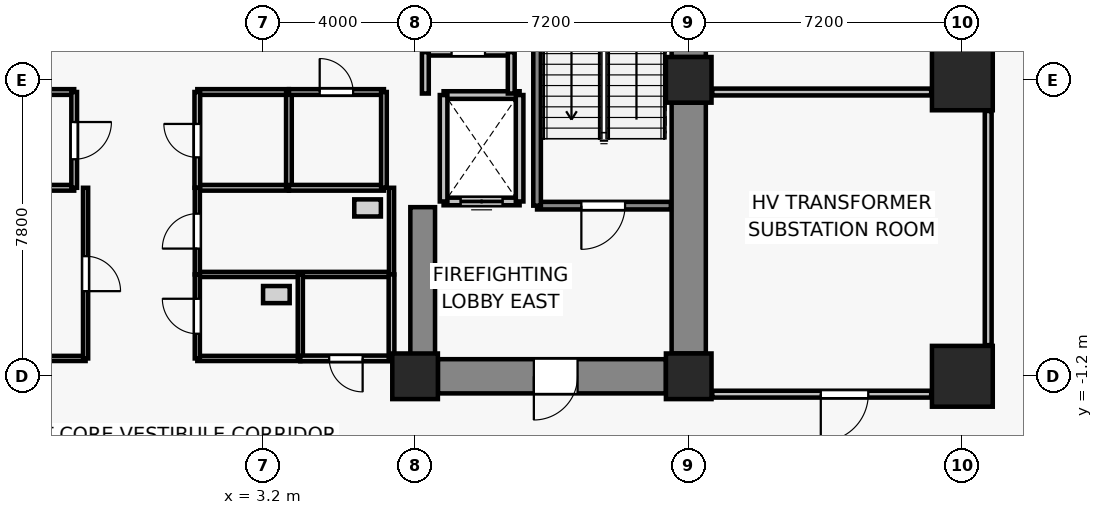
"""IFC4 building model, lengths in metres.
Left out: names, types, materials, properties, quantities, classifications, styles, units other than length and angle.
Written with IfcOpenShell. Run it as: python <this file> out.ifc"""

import sys

from ifc_helpers import new_model, si_unit, direction, frame, frame_2d, origin, origin_2d, place, context, subcontext, project, spatial, rectangle, extrude, source, transform, mapped, element, fill, save


model = new_model("IFC4")
c1 = context("Model", 3, precision=1e-05, world=origin(), true_north=direction((0.0, 1.0)))
c2 = subcontext(c1, "Body", "Model", "MODEL_VIEW")
j1 = project(units=[si_unit("LENGTHUNIT", "METRE"), si_unit("PLANEANGLEUNIT", "RADIAN")], contexts=[c1])
p1 = place(None, origin())
s1 = spatial("IfcSite", under=j1, at=p1, CompositionType="ELEMENT")
p2 = place(p1, origin())
s2 = spatial("IfcBuilding", under=s1, at=p2, CompositionType="ELEMENT")
p3 = place(p2, frame((0.0, 0.0, -8.8)))
s3 = spatial("IfcBuildingStorey", under=s2, at=p3, CompositionType="ELEMENT", Elevation=-8.8)
for number, where, z_axis, x_axis in (
    (1, (7.2, -1.2, 0.0), (0.0, 0.0, 1.0), (1.0, 0.0, 0.0)),
    (2, (14.4, -1.2, 0.0), (0.0, 0.0, 1.0), (1.0, 0.0, 0.0)),
    (3, (14.4, 6.6, 0.0), (0.0, 0.0, 1.0), (1.0, 0.0, 0.0)),
):
    element("IfcColumn", number, at=place(p3, frame(where, z_axis=z_axis, x_axis=x_axis)), inside=s3, PredefinedType="COLUMN", context=c2, shape_type="SweptSolid", body=[
        extrude(rectangle(XDim=1.2, YDim=1.2, at=origin_2d()), origin(), (0.0, 0.0, 1.0), 4.4),
    ])
for number, where, z_axis, x_axis in (
    (4, (21.6, -1.2, 0.0), (0.0, 0.0, 1.0), (1.0, 0.0, 0.0)),
    (5, (21.6, 6.6, 0.0), (0.0, 0.0, 1.0), (1.0, 0.0, 0.0)),
):
    element("IfcColumn", number, at=place(p3, frame(where, z_axis=z_axis, x_axis=x_axis)), inside=s3, PredefinedType="COLUMN", context=c2, shape_type="SweptSolid", body=[
        extrude(rectangle(XDim=1.6, YDim=1.6, at=origin_2d()), origin(), (0.0, 0.0, 1.0), 4.4),
    ])
p4 = place(p3, frame((14.4, -0.6, 0.0), z_axis=(0.0, 0.0, 1.0), x_axis=(0.0, 1.0, 0.0)))
e6 = element("IfcWall", 6, at=p4, inside=s3, PredefinedType="SHEAR", context=c2, shape_type="SweptSolid", body=[
    extrude(rectangle(XDim=6.6, YDim=0.9, at=frame_2d((3.3, 0.0))), origin(), (0.0, 0.0, 1.0), 4.12),
])
p5 = place(p3, frame((14.4, 7.2, 0.0), z_axis=(0.0, 0.0, 1.0), x_axis=(0.0, 1.0, 0.0)))
e7 = element("IfcWall", 7, at=p5, inside=s3, PredefinedType="SHEAR", context=c2, shape_type="SweptSolid", body=[
    extrude(rectangle(XDim=5.7, YDim=0.9, at=frame_2d((2.85, 0.0))), origin(), (0.0, 0.0, 1.0), 4.12),
])
p6 = place(p3, frame((13.8, -1.2, 0.0), z_axis=(0.0, 0.0, 1.0), x_axis=(-1.0, 0.0, 0.0)))
e8 = element("IfcWall", 8, at=p6, inside=s3, PredefinedType="SHEAR", context=c2, shape_type="SweptSolid", body=[
    extrude(rectangle(XDim=6.0, YDim=0.9, at=frame_2d((3.0, 0.0))), origin(), (0.0, 0.0, 1.0), 4.12),
])
p7 = place(p6, frame((2.325, 0.0, 0.0)))
e9 = element("IfcOpeningElement", 9, at=p7, cuts=e8, PredefinedType="OPENING", context=c2, shape_type="SweptSolid", body=[
    extrude(rectangle(XDim=1.15, YDim=2.15, at=frame_2d((0.575, 1.075))), frame((0.0, 0.46, 0.0), z_axis=(0.0, -1.0, 0.0), x_axis=(1.0, 0.0, 0.0)), (0.0, 0.0, 1.0), 0.92),
])
p8 = place(p3, frame((7.4, -0.75, 0.0), z_axis=(0.0, 0.0, 1.0), x_axis=(0.0, 1.0, 0.0)))
e10 = element("IfcWall", 10, at=p8, inside=s3, PredefinedType="SHEAR", context=c2, shape_type="SweptSolid", body=[
    extrude(rectangle(XDim=4.0, YDim=0.65, at=frame_2d((2.0, 0.0))), origin(), (0.0, 0.0, 1.0), 4.12),
])
p9 = place(p3, frame((9.95, 3.4, 0.0), z_axis=(0.0, 0.0, 1.0), x_axis=(-1.0, 0.0, 0.0)))
e11 = element("IfcWall", 11, at=p9, inside=s3, PredefinedType="SOLIDWALL", context=c2, shape_type="SweptSolid", body=[
    extrude(rectangle(XDim=2.0, YDim=0.2, at=frame_2d((1.0, 0.0))), origin(), (0.0, 0.0, 1.0), 4.12),
])
p10 = place(p9, frame((0.45, 0.0, 0.0)))
e12 = element("IfcOpeningElement", 12, at=p10, cuts=e11, PredefinedType="OPENING", context=c2, shape_type="SweptSolid", body=[
    extrude(rectangle(XDim=1.1, YDim=2.2, at=frame_2d((0.55, 1.1))), frame((0.0, 0.11, 0.0), z_axis=(0.0, -1.0, 0.0), x_axis=(1.0, 0.0, 0.0)), (0.0, 0.0, 1.0), 0.22),
])
p11 = place(p3, frame((7.95, 6.2, 0.0), z_axis=(0.0, 0.0, 1.0), x_axis=(1.0, 0.0, 0.0)))
e13 = element("IfcWall", 13, at=p11, inside=s3, PredefinedType="SOLIDWALL", context=c2, shape_type="SweptSolid", body=[
    extrude(rectangle(XDim=2.0, YDim=0.2, at=frame_2d((1.0, 0.0))), origin(), (0.0, 0.0, 1.0), 4.12),
])
for number, where, z_axis, x_axis in (
    (14, (7.95, 3.4, 0.0), (0.0, 0.0, 1.0), (0.0, 1.0, 0.0)),
    (15, (9.95, 6.2, 0.0), (0.0, 0.0, 1.0), (0.0, -1.0, 0.0)),
):
    element("IfcWall", number, at=place(p3, frame(where, z_axis=z_axis, x_axis=x_axis)), inside=s3, PredefinedType="SOLIDWALL", context=c2, shape_type="SweptSolid", body=[
        extrude(rectangle(XDim=2.8, YDim=0.2, at=frame_2d((1.4, 0.0))), origin(), (0.0, 0.0, 1.0), 4.12),
    ])
p12 = place(p3, frame((13.93, 3.29, 0.0), z_axis=(0.0, 0.0, 1.0), x_axis=(-1.0, 0.0, 0.0)))
e16 = element("IfcWall", 16, at=p12, inside=s3, PredefinedType="SOLIDWALL", context=c2, shape_type="SweptSolid", body=[
    extrude(rectangle(XDim=3.52, YDim=0.2, at=frame_2d((1.76, 0.0))), origin(), (0.0, 0.0, 1.0), 4.12),
])
p13 = place(p12, frame((1.205, 0.0, 0.0)))
e17 = element("IfcOpeningElement", 17, at=p13, cuts=e16, PredefinedType="OPENING", context=c2, shape_type="SweptSolid", body=[
    extrude(rectangle(XDim=1.15, YDim=2.15, at=frame_2d((0.575, 1.075))), frame((0.0, 0.11, 0.0), z_axis=(0.0, -1.0, 0.0), x_axis=(1.0, 0.0, 0.0)), (0.0, 0.0, 1.0), 0.22),
])
p14 = place(p3, frame((10.41, 3.29, 0.0), z_axis=(0.0, 0.0, 1.0), x_axis=(0.0, 1.0, 0.0)))
e18 = element("IfcWall", 18, at=p14, inside=s3, PredefinedType="SOLIDWALL", context=c2, shape_type="SweptSolid", body=[
    extrude(rectangle(XDim=8.84, YDim=0.2, at=frame_2d((4.42, 0.0))), origin(), (0.0, 0.0, 1.0), 4.12),
])
p15 = place(p3, frame((7.47, 7.33, 0.0), z_axis=(0.0, 0.0, 1.0), x_axis=(1.0, 0.0, 0.0)))
e19 = element("IfcWall", 19, at=p15, inside=s3, PredefinedType="PARTITIONING", context=c2, shape_type="SweptSolid", body=[
    extrude(rectangle(XDim=2.26, YDim=0.18, at=frame_2d((1.13, 0.0))), origin(), (0.0, 0.0, 1.0), 3.41),
])
p16 = place(p15, frame((0.69, 0.0, 0.0)))
e20 = element("IfcOpeningElement", 20, at=p16, cuts=e19, PredefinedType="OPENING", context=c2, shape_type="SweptSolid", body=[
    extrude(rectangle(XDim=0.88, YDim=2.1, at=frame_2d((0.44, 1.05))), frame((0.0, 0.1, 0.0), z_axis=(0.0, -1.0, 0.0), x_axis=(1.0, 0.0, 0.0)), (0.0, 0.0, 1.0), 0.2),
])
p17 = place(p3, frame((7.47, 6.24, 0.0), z_axis=(0.0, 0.0, 1.0), x_axis=(0.0, 1.0, 0.0)))
e21 = element("IfcWall", 21, at=p17, inside=s3, PredefinedType="PARTITIONING", context=c2, shape_type="SweptSolid", body=[
    extrude(rectangle(XDim=1.09, YDim=0.18, at=frame_2d((0.545, 0.0))), origin(), (0.0, 0.0, 1.0), 3.41),
])
p18 = place(p3, frame((9.73, 7.33, 0.0), z_axis=(0.0, 0.0, 1.0), x_axis=(0.0, -1.0, 0.0)))
e22 = element("IfcWall", 22, at=p18, inside=s3, PredefinedType="PARTITIONING", context=c2, shape_type="SweptSolid", body=[
    extrude(rectangle(XDim=1.09, YDim=0.18, at=frame_2d((0.545, 0.0))), origin(), (0.0, 0.0, 1.0), 4.12),
])
for number, where, z_axis, x_axis in (
    (23, (-1.77, 3.76, 0.0), (0.0, 0.0, 1.0), (-1.0, 0.0, 0.0)),
    (24, (-6.18, 6.28, 0.0), (0.0, 0.0, 1.0), (1.0, 0.0, 0.0)),
):
    element("IfcWall", number, at=place(p3, frame(where, z_axis=z_axis, x_axis=x_axis)), inside=s3, PredefinedType="PARTITIONING", context=c2, shape_type="SweptSolid", body=[
        extrude(rectangle(XDim=4.41, YDim=0.15, at=frame_2d((2.205, 0.0))), origin(), (0.0, 0.0, 1.0), 4.12),
    ])
p19 = place(p3, frame((-1.77, 6.28, 0.0), z_axis=(0.0, 0.0, 1.0), x_axis=(0.0, -1.0, 0.0)))
e25 = element("IfcWall", 25, at=p19, inside=s3, PredefinedType="PARTITIONING", context=c2, shape_type="SweptSolid", body=[
    extrude(rectangle(XDim=2.52, YDim=0.15, at=frame_2d((1.26, 0.0))), origin(), (0.0, 0.0, 1.0), 4.12),
])
p20 = place(p19, frame((0.79, 0.0, 0.0)))
e26 = element("IfcOpeningElement", 26, at=p20, cuts=e25, PredefinedType="OPENING", context=c2, shape_type="SweptSolid", body=[
    extrude(rectangle(XDim=0.98, YDim=2.15, at=frame_2d((0.49, 1.075))), frame((0.0, 0.085, 0.0), z_axis=(0.0, -1.0, 0.0), x_axis=(1.0, 0.0, 0.0)), (0.0, 0.0, 1.0), 0.17),
])
for number, where, z_axis, x_axis in (
    (27, (3.88, 3.76, 0.0), (0.0, 0.0, 1.0), (-1.0, 0.0, 0.0)),
    (28, (1.47, 6.28, 0.0), (0.0, 0.0, 1.0), (1.0, 0.0, 0.0)),
):
    element("IfcWall", number, at=place(p3, frame(where, z_axis=z_axis, x_axis=x_axis)), inside=s3, PredefinedType="PARTITIONING", context=c2, shape_type="SweptSolid", body=[
        extrude(rectangle(XDim=2.41, YDim=0.15, at=frame_2d((1.205, 0.0))), origin(), (0.0, 0.0, 1.0), 4.12),
    ])
p21 = place(p3, frame((1.47, 3.76, 0.0), z_axis=(0.0, 0.0, 1.0), x_axis=(0.0, 1.0, 0.0)))
e29 = element("IfcWall", 29, at=p21, inside=s3, PredefinedType="PARTITIONING", context=c2, shape_type="SweptSolid", body=[
    extrude(rectangle(XDim=2.52, YDim=0.15, at=frame_2d((1.26, 0.0))), origin(), (0.0, 0.0, 1.0), 4.12),
])
p22 = place(p21, frame((0.8, 0.0, 0.0)))
e30 = element("IfcOpeningElement", 30, at=p22, cuts=e29, PredefinedType="OPENING", context=c2, shape_type="SweptSolid", body=[
    extrude(rectangle(XDim=0.88, YDim=2.1, at=frame_2d((0.44, 1.05))), frame((0.0, 0.085, 0.0), z_axis=(0.0, -1.0, 0.0), x_axis=(1.0, 0.0, 0.0)), (0.0, 0.0, 1.0), 0.17),
])
p23 = place(p3, frame((3.88, 6.28, 0.0), z_axis=(0.0, 0.0, 1.0), x_axis=(0.0, -1.0, 0.0)))
e31 = element("IfcWall", 31, at=p23, inside=s3, PredefinedType="PARTITIONING", context=c2, shape_type="SweptSolid", body=[
    extrude(rectangle(XDim=2.52, YDim=0.15, at=frame_2d((1.26, 0.0))), origin(), (0.0, 0.0, 1.0), 4.12),
])
p24 = place(p3, frame((6.38, 3.76, 0.0), z_axis=(0.0, 0.0, 1.0), x_axis=(-1.0, 0.0, 0.0)))
e32 = element("IfcWall", 32, at=p24, inside=s3, PredefinedType="PARTITIONING", context=c2, shape_type="SweptSolid", body=[
    extrude(rectangle(XDim=2.5, YDim=0.15, at=frame_2d((1.25, 0.0))), origin(), (0.0, 0.0, 1.0), 4.12),
])
p25 = place(p3, frame((3.88, 6.28, 0.0), z_axis=(0.0, 0.0, 1.0), x_axis=(1.0, 0.0, 0.0)))
e33 = element("IfcWall", 33, at=p25, inside=s3, PredefinedType="PARTITIONING", context=c2, shape_type="SweptSolid", body=[
    extrude(rectangle(XDim=2.5, YDim=0.15, at=frame_2d((1.25, 0.0))), origin(), (0.0, 0.0, 1.0), 4.12),
])
p26 = place(p25, frame((0.81, 0.0, 0.0)))
e34 = element("IfcOpeningElement", 34, at=p26, cuts=e33, PredefinedType="OPENING", context=c2, shape_type="SweptSolid", body=[
    extrude(rectangle(XDim=0.88, YDim=2.15, at=frame_2d((0.44, 1.075))), frame((0.0, 0.085, 0.0), z_axis=(0.0, -1.0, 0.0), x_axis=(1.0, 0.0, 0.0)), (0.0, 0.0, 1.0), 0.17),
])
p27 = place(p3, frame((6.38, 6.28, 0.0), z_axis=(0.0, 0.0, 1.0), x_axis=(0.0, -1.0, 0.0)))
e35 = element("IfcWall", 35, at=p27, inside=s3, PredefinedType="PARTITIONING", context=c2, shape_type="SweptSolid", body=[
    extrude(rectangle(XDim=2.52, YDim=0.15, at=frame_2d((1.26, 0.0))), origin(), (0.0, 0.0, 1.0), 4.12),
])
p28 = place(p3, frame((-1.47, -0.73, 0.0), z_axis=(0.0, 0.0, 1.0), x_axis=(-1.0, 0.0, 0.0)))
e36 = element("IfcWall", 36, at=p28, inside=s3, PredefinedType="PARTITIONING", context=c2, shape_type="SweptSolid", body=[
    extrude(rectangle(XDim=5.11, YDim=0.135, at=frame_2d((2.555, 0.0))), origin(), (0.0, 0.0, 1.0), 4.12),
])
p29 = place(p3, frame((-1.47, 3.76, 0.0), z_axis=(0.0, 0.0, 1.0), x_axis=(0.0, -1.0, 0.0)))
e37 = element("IfcWall", 37, at=p29, inside=s3, PredefinedType="PARTITIONING", context=c2, shape_type="SweptSolid", body=[
    extrude(rectangle(XDim=4.49, YDim=0.135, at=frame_2d((2.245, 0.0))), origin(), (0.0, 0.0, 1.0), 3.493),
])
p30 = place(p29, frame((1.8, 0.0, 0.0)))
e38 = element("IfcOpeningElement", 38, at=p30, cuts=e37, PredefinedType="OPENING", context=c2, shape_type="SweptSolid", body=[
    extrude(rectangle(XDim=0.92, YDim=2.1, at=frame_2d((0.46, 1.05))), frame((0.0, 0.077, 0.0), z_axis=(0.0, -1.0, 0.0), x_axis=(1.0, 0.0, 0.0)), (0.0, 0.0, 1.0), 0.155),
])
p31 = place(p3, frame((6.58, 1.48, 0.0), z_axis=(0.0, 0.0, 1.0), x_axis=(-1.0, 0.0, 0.0)))
e39 = element("IfcWall", 39, at=p31, inside=s3, PredefinedType="PARTITIONING", context=c2, shape_type="SweptSolid", body=[
    extrude(rectangle(XDim=5.11, YDim=0.135, at=frame_2d((2.555, 0.0))), origin(), (0.0, 0.0, 1.0), 4.12),
])
p32 = place(p3, frame((1.47, 1.48, 0.0), z_axis=(0.0, 0.0, 1.0), x_axis=(0.0, 1.0, 0.0)))
e40 = element("IfcWall", 40, at=p32, inside=s3, PredefinedType="PARTITIONING", context=c2, shape_type="SweptSolid", body=[
    extrude(rectangle(XDim=2.28, YDim=0.135, at=frame_2d((1.14, 0.0))), origin(), (0.0, 0.0, 1.0), 3.493),
])
p33 = place(p32, frame((0.68, 0.0, 0.0)))
e41 = element("IfcOpeningElement", 41, at=p33, cuts=e40, PredefinedType="OPENING", context=c2, shape_type="SweptSolid", body=[
    extrude(rectangle(XDim=0.92, YDim=2.1, at=frame_2d((0.46, 1.05))), frame((0.0, 0.077, 0.0), z_axis=(0.0, -1.0, 0.0), x_axis=(1.0, 0.0, 0.0)), (0.0, 0.0, 1.0), 0.155),
])
p34 = place(p3, frame((6.58, 3.76, 0.0), z_axis=(0.0, 0.0, 1.0), x_axis=(0.0, -1.0, 0.0)))
e42 = element("IfcWall", 42, at=p34, inside=s3, PredefinedType="PARTITIONING", context=c2, shape_type="SweptSolid", body=[
    extrude(rectangle(XDim=2.28, YDim=0.135, at=frame_2d((1.14, 0.0))), origin(), (0.0, 0.0, 1.0), 3.493),
])
p35 = place(p3, frame((4.18, -0.73, 0.0), z_axis=(0.0, 0.0, 1.0), x_axis=(-1.0, 0.0, 0.0)))
e43 = element("IfcWall", 43, at=p35, inside=s3, PredefinedType="PARTITIONING", context=c2, shape_type="SweptSolid", body=[
    extrude(rectangle(XDim=2.71, YDim=0.135, at=frame_2d((1.355, 0.0))), origin(), (0.0, 0.0, 1.0), 4.12),
])
p36 = place(p3, frame((1.47, -0.73, 0.0), z_axis=(0.0, 0.0, 1.0), x_axis=(0.0, 1.0, 0.0)))
e44 = element("IfcWall", 44, at=p36, inside=s3, PredefinedType="PARTITIONING", context=c2, shape_type="SweptSolid", body=[
    extrude(rectangle(XDim=2.21, YDim=0.135, at=frame_2d((1.105, 0.0))), origin(), (0.0, 0.0, 1.0), 4.12),
])
p37 = place(p36, frame((0.65, 0.0, 0.0)))
e45 = element("IfcOpeningElement", 45, at=p37, cuts=e44, PredefinedType="OPENING", context=c2, shape_type="SweptSolid", body=[
    extrude(rectangle(XDim=0.92, YDim=2.1, at=frame_2d((0.46, 1.05))), frame((0.0, 0.077, 0.0), z_axis=(0.0, -1.0, 0.0), x_axis=(1.0, 0.0, 0.0)), (0.0, 0.0, 1.0), 0.155),
])
p38 = place(p3, frame((4.18, 1.48, 0.0), z_axis=(0.0, 0.0, 1.0), x_axis=(0.0, -1.0, 0.0)))
e46 = element("IfcWall", 46, at=p38, inside=s3, PredefinedType="PARTITIONING", context=c2, shape_type="SweptSolid", body=[
    extrude(rectangle(XDim=2.21, YDim=0.135, at=frame_2d((1.105, 0.0))), origin(), (0.0, 0.0, 1.0), 4.12),
])
p39 = place(p3, frame((6.58, -0.73, 0.0), z_axis=(0.0, 0.0, 1.0), x_axis=(-1.0, 0.0, 0.0)))
e47 = element("IfcWall", 47, at=p39, inside=s3, PredefinedType="PARTITIONING", context=c2, shape_type="SweptSolid", body=[
    extrude(rectangle(XDim=2.4, YDim=0.15, at=frame_2d((1.2, 0.0))), origin(), (0.0, 0.0, 1.0), 4.12),
])
p40 = place(p39, frame((0.76, 0.0, 0.0)))
e48 = element("IfcOpeningElement", 48, at=p40, cuts=e47, PredefinedType="OPENING", context=c2, shape_type="SweptSolid", body=[
    extrude(rectangle(XDim=0.88, YDim=2.1, at=frame_2d((0.44, 1.05))), frame((0.0, 0.085, 0.0), z_axis=(0.0, -1.0, 0.0), x_axis=(1.0, 0.0, 0.0)), (0.0, 0.0, 1.0), 0.17),
])
p41 = place(p3, frame((6.58, 1.48, 0.0), z_axis=(0.0, 0.0, 1.0), x_axis=(0.0, -1.0, 0.0)))
e49 = element("IfcWall", 49, at=p41, inside=s3, PredefinedType="PARTITIONING", context=c2, shape_type="SweptSolid", body=[
    extrude(rectangle(XDim=2.21, YDim=0.15, at=frame_2d((1.105, 0.0))), origin(), (0.0, 0.0, 1.0), 4.12),
])
p42 = place(p3, frame((20.78, -1.67, 0.0), z_axis=(0.0, 0.0, 1.0), x_axis=(-1.0, 0.0, 0.0)))
e50 = element("IfcWall", 50, at=p42, inside=s3, PredefinedType="PARTITIONING", context=c2, shape_type="SweptSolid", body=[
    extrude(rectangle(XDim=5.76, YDim=0.18, at=frame_2d((2.88, 0.0))), origin(), (0.0, 0.0, 1.0), 4.12),
])
p43 = place(p42, frame((1.655, 0.0, 0.0)))
e51 = element("IfcOpeningElement", 51, at=p43, cuts=e50, PredefinedType="OPENING", context=c2, shape_type="SweptSolid", body=[
    extrude(rectangle(XDim=1.25, YDim=2.15, at=frame_2d((0.625, 1.075))), frame((0.0, 0.1, 0.0), z_axis=(0.0, -1.0, 0.0), x_axis=(1.0, 0.0, 0.0)), (0.0, 0.0, 1.0), 0.2),
])
p44 = place(p3, frame((15.02, 6.28, 0.0), z_axis=(0.0, 0.0, 1.0), x_axis=(1.0, 0.0, 0.0)))
e52 = element("IfcWall", 52, at=p44, inside=s3, PredefinedType="PARTITIONING", context=c2, shape_type="SweptSolid", body=[
    extrude(rectangle(XDim=5.76, YDim=0.18, at=frame_2d((2.88, 0.0))), origin(), (0.0, 0.0, 1.0), 4.12),
])
p45 = place(p3, frame((22.28, 5.78, 0.0), z_axis=(0.0, 0.0, 1.0), x_axis=(0.0, -1.0, 0.0)))
e53 = element("IfcWall", 53, at=p45, inside=s3, PredefinedType="PARTITIONING", context=c2, shape_type="SweptSolid", body=[
    extrude(rectangle(XDim=6.16, YDim=0.18, at=frame_2d((3.08, 0.0))), origin(), (0.0, 0.0, 1.0), 3.493),
])
m1 = source(origin(), c2, "Body", "SweptSolid", [
    extrude(rectangle(XDim=1.1, YDim=2.2, at=frame_2d((0.55, 1.1))), frame((0.0, 0.025, 0.0), z_axis=(0.0, -1.0, 0.0), x_axis=(1.0, 0.0, 0.0)), (0.0, 0.0, 1.0), 0.05),
])
p46 = place(p10, origin())
e54 = element("IfcDoor", 54, at=p46, inside=s3, OperationType="DOUBLE_DOOR_SLIDING", PredefinedType="DOOR", context=c2, shape_type="MappedRepresentation", body=[
    mapped(m1, transform((0.0, 0.0, 0.0), x_axis=(1.0, 0.0, 0.0), y_axis=(0.0, 1.0, 0.0), z_axis=(0.0, 0.0, 1.0), scale=1.0)),
])
fill(e12, e54)
m2 = source(origin(), c2, "Body", "SweptSolid", [
    extrude(rectangle(XDim=1.15, YDim=2.15, at=frame_2d((0.575, 1.075))), frame((0.0, 0.025, 0.0), z_axis=(0.0, -1.0, 0.0), x_axis=(1.0, 0.0, 0.0)), (0.0, 0.0, 1.0), 0.05),
])
p47 = place(p13, origin())
e55 = element("IfcDoor", 55, at=p47, inside=s3, OperationType="SINGLE_SWING_RIGHT", PredefinedType="DOOR", context=c2, shape_type="MappedRepresentation", body=[
    mapped(m2, transform((0.0, 0.0, 0.0), x_axis=(1.0, 0.0, 0.0), y_axis=(0.0, 1.0, 0.0), z_axis=(0.0, 0.0, 1.0), scale=1.0)),
])
fill(e17, e55)
p48 = place(p7, origin())
e56 = element("IfcDoor", 56, at=p48, inside=s3, OperationType="SINGLE_SWING_RIGHT", PredefinedType="DOOR", context=c2, shape_type="MappedRepresentation", body=[
    mapped(m2, transform((0.0, 0.0, 0.0), x_axis=(1.0, 0.0, 0.0), y_axis=(0.0, 1.0, 0.0), z_axis=(0.0, 0.0, 1.0), scale=1.0)),
])
fill(e9, e56)
m3 = source(origin(), c2, "Body", "SweptSolid", [
    extrude(rectangle(XDim=0.98, YDim=2.15, at=frame_2d((0.49, 1.075))), frame((0.0, 0.025, 0.0), z_axis=(0.0, -1.0, 0.0), x_axis=(1.0, 0.0, 0.0)), (0.0, 0.0, 1.0), 0.05),
])
p49 = place(p20, origin())
e57 = element("IfcDoor", 57, at=p49, inside=s3, OperationType="SINGLE_SWING_LEFT", PredefinedType="DOOR", context=c2, shape_type="MappedRepresentation", body=[
    mapped(m3, transform((0.0, 0.0, 0.0), x_axis=(1.0, 0.0, 0.0), y_axis=(0.0, 1.0, 0.0), z_axis=(0.0, 0.0, 1.0), scale=1.0)),
])
fill(e26, e57)
m4 = source(origin(), c2, "Body", "SweptSolid", [
    extrude(rectangle(XDim=0.88, YDim=2.1, at=frame_2d((0.44, 1.05))), frame((0.0, 0.025, 0.0), z_axis=(0.0, -1.0, 0.0), x_axis=(1.0, 0.0, 0.0)), (0.0, 0.0, 1.0), 0.05),
])
p50 = place(p22, origin())
e58 = element("IfcDoor", 58, at=p50, inside=s3, OperationType="SINGLE_SWING_RIGHT", PredefinedType="DOOR", context=c2, shape_type="MappedRepresentation", body=[
    mapped(m4, transform((0.0, 0.0, 0.0), x_axis=(1.0, 0.0, 0.0), y_axis=(0.0, 1.0, 0.0), z_axis=(0.0, 0.0, 1.0), scale=1.0)),
])
fill(e30, e58)
m5 = source(origin(), c2, "Body", "SweptSolid", [
    extrude(rectangle(XDim=0.88, YDim=2.15, at=frame_2d((0.44, 1.075))), frame((0.0, 0.025, 0.0), z_axis=(0.0, -1.0, 0.0), x_axis=(1.0, 0.0, 0.0)), (0.0, 0.0, 1.0), 0.05),
])
p51 = place(p26, origin())
e59 = element("IfcDoor", 59, at=p51, inside=s3, OperationType="SINGLE_SWING_LEFT", PredefinedType="DOOR", context=c2, shape_type="MappedRepresentation", body=[
    mapped(m5, transform((0.0, 0.0, 0.0), x_axis=(1.0, 0.0, 0.0), y_axis=(0.0, 1.0, 0.0), z_axis=(0.0, 0.0, 1.0), scale=1.0)),
])
fill(e34, e59)
m6 = source(origin(), c2, "Body", "SweptSolid", [
    extrude(rectangle(XDim=0.92, YDim=2.1, at=frame_2d((0.46, 1.05))), frame((0.0, 0.025, 0.0), z_axis=(0.0, -1.0, 0.0), x_axis=(1.0, 0.0, 0.0)), (0.0, 0.0, 1.0), 0.05),
])
p52 = place(p30, origin())
e60 = element("IfcDoor", 60, at=p52, inside=s3, OperationType="SINGLE_SWING_RIGHT", PredefinedType="DOOR", context=c2, shape_type="MappedRepresentation", body=[
    mapped(m6, transform((0.0, 0.0, 0.0), x_axis=(1.0, 0.0, 0.0), y_axis=(0.0, 1.0, 0.0), z_axis=(0.0, 0.0, 1.0), scale=1.0)),
])
fill(e38, e60)
p53 = place(p33, origin())
e61 = element("IfcDoor", 61, at=p53, inside=s3, OperationType="SINGLE_SWING_LEFT", PredefinedType="DOOR", context=c2, shape_type="MappedRepresentation", body=[
    mapped(m6, transform((0.0, 0.0, 0.0), x_axis=(1.0, 0.0, 0.0), y_axis=(0.0, 1.0, 0.0), z_axis=(0.0, 0.0, 1.0), scale=1.0)),
])
fill(e41, e61)
p54 = place(p37, origin())
e62 = element("IfcDoor", 62, at=p54, inside=s3, OperationType="SINGLE_SWING_RIGHT", PredefinedType="DOOR", context=c2, shape_type="MappedRepresentation", body=[
    mapped(m6, transform((0.0, 0.0, 0.0), x_axis=(1.0, 0.0, 0.0), y_axis=(0.0, 1.0, 0.0), z_axis=(0.0, 0.0, 1.0), scale=1.0)),
])
fill(e45, e62)
p55 = place(p40, origin())
e63 = element("IfcDoor", 63, at=p55, inside=s3, OperationType="SINGLE_SWING_LEFT", PredefinedType="DOOR", context=c2, shape_type="MappedRepresentation", body=[
    mapped(m4, transform((0.0, 0.0, 0.0), x_axis=(1.0, 0.0, 0.0), y_axis=(0.0, 1.0, 0.0), z_axis=(0.0, 0.0, 1.0), scale=1.0)),
])
fill(e48, e63)
m7 = source(origin(), c2, "Body", "SweptSolid", [
    extrude(rectangle(XDim=1.25, YDim=2.15, at=frame_2d((0.625, 1.075))), frame((0.0, 0.025, 0.0), z_axis=(0.0, -1.0, 0.0), x_axis=(1.0, 0.0, 0.0)), (0.0, 0.0, 1.0), 0.05),
])
p56 = place(p43, origin())
e64 = element("IfcDoor", 64, at=p56, inside=s3, OperationType="SINGLE_SWING_RIGHT", PredefinedType="DOOR", context=c2, shape_type="MappedRepresentation", body=[
    mapped(m7, transform((0.0, 0.0, 0.0), x_axis=(1.0, 0.0, 0.0), y_axis=(0.0, 1.0, 0.0), z_axis=(0.0, 0.0, 1.0), scale=1.0)),
])
fill(e51, e64)
p57 = place(p16, origin())
e65 = element("IfcDoor", 65, at=p57, inside=s3, OperationType="SINGLE_SWING_LEFT", PredefinedType="DOOR", context=c2, shape_type="MappedRepresentation", body=[
    mapped(m4, transform((0.0, 0.0, 0.0), x_axis=(1.0, 0.0, 0.0), y_axis=(0.0, 1.0, 0.0), z_axis=(0.0, 0.0, 1.0), scale=1.0)),
])
fill(e20, e65)
save(model, sys.argv[1])
